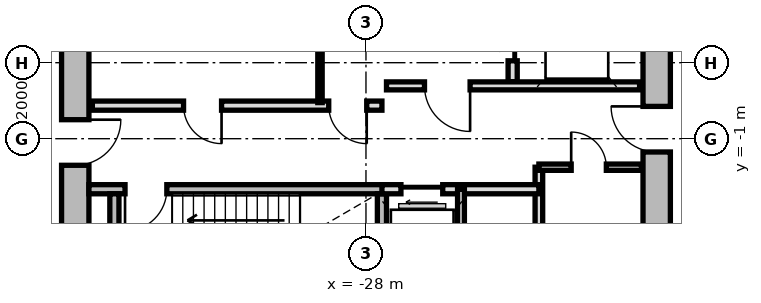
"""IFC4 building model, lengths in metres.
Left out: names, types, materials, properties, quantities, classifications, styles, units other than length and angle.
Written with IfcOpenShell. Run it as: python <this file> out.ifc"""

import sys

from ifc_helpers import new_model, si_unit, direction, frame, frame_2d, origin, place, context, subcontext, project, spatial, rectangle, extrude, source, transform, mapped, element, fill, save


model = new_model("IFC4")
c1 = context("Model", 3, precision=1e-05, world=origin(), true_north=direction((0.0, 1.0)))
c2 = subcontext(c1, "Body", "Model", "MODEL_VIEW")
j1 = project(units=[si_unit("LENGTHUNIT", "METRE"), si_unit("PLANEANGLEUNIT", "RADIAN")], contexts=[c1])
p1 = place(None, origin())
s1 = spatial("IfcSite", under=j1, at=p1, CompositionType="ELEMENT")
p2 = place(p1, origin())
s2 = spatial("IfcBuilding", under=s1, at=p2, CompositionType="ELEMENT")
p3 = place(p2, frame((0.0, 0.0, 129.8)))
s3 = spatial("IfcBuildingStorey", under=s2, at=p3, CompositionType="ELEMENT", Elevation=129.8)
m1 = source(origin(), c2, "Body", "SweptSolid", [
    extrude(rectangle(XDim=11.0, YDim=0.72, at=frame_2d((5.5, 0.0))), origin(), (0.0, 0.0, 1.0), 4.08),
])
p4 = place(p3, frame((-35.65, -5.5, 0.0), z_axis=(0.0, 0.0, 1.0), x_axis=(0.0, 1.0, 0.0)))
e1 = element("IfcWall", 1, at=p4, inside=s3, PredefinedType="SHEAR", context=c2, shape_type="MappedRepresentation", body=[
    mapped(m1, transform((0.0, 0.0, 0.0), x_axis=(1.0, 0.0, 0.0), y_axis=(0.0, 1.0, 0.0), z_axis=(0.0, 0.0, 1.0), scale=1.0)),
])
p5 = place(p4, frame((3.8, 0.0, 0.0)))
e2 = element("IfcOpeningElement", 2, at=p5, cuts=e1, PredefinedType="OPENING", context=c2, shape_type="SweptSolid", body=[
    extrude(rectangle(XDim=1.2, YDim=2.15, at=frame_2d((0.6, 1.075))), frame((0.0, 0.37, 0.0), z_axis=(0.0, -1.0, 0.0), x_axis=(1.0, 0.0, 0.0)), (0.0, 0.0, 1.0), 0.74),
])
p6 = place(p3, frame((-20.35, 5.5, 0.0), z_axis=(0.0, 0.0, 1.0), x_axis=(0.0, -1.0, 0.0)))
e3 = element("IfcWall", 3, at=p6, inside=s3, PredefinedType="SHEAR", context=c2, shape_type="MappedRepresentation", body=[
    mapped(m1, transform((0.0, 0.0, 0.0), x_axis=(1.0, 0.0, 0.0), y_axis=(0.0, 1.0, 0.0), z_axis=(0.0, 0.0, 1.0), scale=1.0)),
])
p7 = place(p6, frame((5.65, 0.0, 0.0)))
e4 = element("IfcOpeningElement", 4, at=p7, cuts=e3, PredefinedType="OPENING", context=c2, shape_type="SweptSolid", body=[
    extrude(rectangle(XDim=1.2, YDim=2.15, at=frame_2d((0.6, 1.075))), frame((0.0, 0.37, 0.0), z_axis=(0.0, -1.0, 0.0), x_axis=(1.0, 0.0, 0.0)), (0.0, 0.0, 1.0), 0.74),
])
p8 = place(p6, frame((9.3, 0.0, 0.0)))
e5 = element("IfcOpeningElement", 5, at=p8, cuts=e3, PredefinedType="OPENING", context=c2, shape_type="SweptSolid", body=[
    extrude(rectangle(XDim=1.0, YDim=2.1, at=frame_2d((0.5, 1.05))), frame((0.0, 0.37, 0.0), z_axis=(0.0, -1.0, 0.0), x_axis=(1.0, 0.0, 0.0)), (0.0, 0.0, 1.0), 0.74),
])
m2 = source(origin(), c2, "Body", "SweptSolid", [
    extrude(rectangle(XDim=7.83, YDim=0.24, at=frame_2d((3.915, 0.0))), origin(), (0.0, 0.0, 1.0), 4.08),
])
p9 = place(p3, frame((-35.29, -2.33, 0.0), z_axis=(0.0, 0.0, 1.0), x_axis=(1.0, 0.0, 0.0)))
e6 = element("IfcWall", 6, at=p9, inside=s3, PredefinedType="PARTITIONING", context=c2, shape_type="MappedRepresentation", body=[
    mapped(m2, transform((0.0, 0.0, 0.0), x_axis=(1.0, 0.0, 0.0), y_axis=(0.0, 1.0, 0.0), z_axis=(0.0, 0.0, 1.0), scale=1.0)),
])
p10 = place(p9, frame((0.95, 0.0, 0.0)))
e7 = element("IfcOpeningElement", 7, at=p10, cuts=e6, PredefinedType="OPENING", context=c2, shape_type="SweptSolid", body=[
    extrude(rectangle(XDim=1.1, YDim=2.15, at=frame_2d((0.55, 1.075))), frame((0.0, 0.13, 0.0), z_axis=(0.0, -1.0, 0.0), x_axis=(1.0, 0.0, 0.0)), (0.0, 0.0, 1.0), 0.26),
])
m3 = source(origin(), c2, "Body", "SweptSolid", [
    extrude(rectangle(XDim=3.14, YDim=0.24, at=frame_2d((1.57, 0.0))), origin(), (0.0, 0.0, 1.0), 4.08),
])
for number, where, z_axis, x_axis in (
    (8, (-34.62, -5.59, 0.0), (0.0, 0.0, 1.0), (0.0, 1.0, 0.0)),
    (9, (-27.58, -5.59, 0.0), (0.0, 0.0, 1.0), (0.0, 1.0, 0.0)),
):
    element("IfcWall", number, at=place(p3, frame(where, z_axis=z_axis, x_axis=x_axis)), inside=s3, PredefinedType="PARTITIONING", context=c2, shape_type="MappedRepresentation", body=[
        mapped(m3, transform((0.0, 0.0, 0.0), x_axis=(1.0, 0.0, 0.0), y_axis=(0.0, 1.0, 0.0), z_axis=(0.0, 0.0, 1.0), scale=1.0)),
    ])
m4 = source(origin(), c2, "Body", "SweptSolid", [
    extrude(rectangle(XDim=5.0, YDim=0.24, at=frame_2d((2.5, 0.0))), origin(), (0.0, 0.0, 1.0), 4.065),
])
p11 = place(p3, frame((-24.14, 0.5, 0.0), z_axis=(0.0, 0.0, 1.0), x_axis=(0.0, 1.0, 0.0)))
e10 = element("IfcWall", 10, at=p11, inside=s3, PredefinedType="PARTITIONING", context=c2, shape_type="MappedRepresentation", body=[
    mapped(m4, transform((0.0, 0.0, 0.0), x_axis=(1.0, 0.0, 0.0), y_axis=(0.0, 1.0, 0.0), z_axis=(0.0, 0.0, 1.0), scale=1.0)),
])
p12 = place(p11, frame((3.05, 0.0, 0.0)))
e11 = element("IfcOpeningElement", 11, at=p12, cuts=e10, PredefinedType="OPENING", context=c2, shape_type="SweptSolid", body=[
    extrude(rectangle(XDim=1.3, YDim=2.2, at=frame_2d((0.65, 1.1))), frame((0.0, 0.13, 0.0), z_axis=(0.0, -1.0, 0.0), x_axis=(1.0, 0.0, 0.0)), (0.0, 0.0, 1.0), 0.26),
])
p13 = place(p11, frame((0.55, 0.0, 0.0)))
e12 = element("IfcOpeningElement", 12, at=p13, cuts=e10, PredefinedType="OPENING", context=c2, shape_type="SweptSolid", body=[
    extrude(rectangle(XDim=1.3, YDim=2.2, at=frame_2d((0.65, 1.1))), frame((0.0, 0.13, 0.0), z_axis=(0.0, -1.0, 0.0), x_axis=(1.0, 0.0, 0.0)), (0.0, 0.0, 1.0), 0.26),
])
m5 = source(origin(), c2, "Body", "SweptSolid", [
    extrude(rectangle(XDim=6.66, YDim=0.21, at=frame_2d((3.33, 0.0))), origin(), (0.0, 0.0, 1.0), 4.065),
])
p14 = place(p3, frame((-27.46, 0.39, 0.0), z_axis=(0.0, 0.0, 1.0), x_axis=(1.0, 0.0, 0.0)))
e13 = element("IfcWall", 13, at=p14, inside=s3, PredefinedType="PARTITIONING", context=c2, shape_type="MappedRepresentation", body=[
    mapped(m5, transform((0.0, 0.0, 0.0), x_axis=(1.0, 0.0, 0.0), y_axis=(0.0, 1.0, 0.0), z_axis=(0.0, 0.0, 1.0), scale=1.0)),
])
p15 = place(p14, frame((1.0, 0.0, 0.0)))
e14 = element("IfcOpeningElement", 14, at=p15, cuts=e13, PredefinedType="OPENING", context=c2, shape_type="SweptSolid", body=[
    extrude(rectangle(XDim=1.2, YDim=2.15, at=frame_2d((0.6, 1.075))), frame((0.0, 0.115, 0.0), z_axis=(0.0, -1.0, 0.0), x_axis=(1.0, 0.0, 0.0)), (0.0, 0.0, 1.0), 0.23),
])
m6 = source(origin(), c2, "Body", "SweptSolid", [
    extrude(rectangle(XDim=7.62, YDim=0.24, at=frame_2d((3.81, 0.0))), origin(), (0.0, 0.0, 1.0), 4.065),
])
p16 = place(p3, frame((-35.2, -0.13, 0.0), z_axis=(0.0, 0.0, 1.0), x_axis=(1.0, 0.0, 0.0)))
e15 = element("IfcWall", 15, at=p16, inside=s3, PredefinedType="PARTITIONING", context=c2, shape_type="MappedRepresentation", body=[
    mapped(m6, transform((0.0, 0.0, 0.0), x_axis=(1.0, 0.0, 0.0), y_axis=(0.0, 1.0, 0.0), z_axis=(0.0, 0.0, 1.0), scale=1.0)),
])
p17 = place(p16, frame((6.22, 0.0, 0.0)))
e16 = element("IfcOpeningElement", 16, at=p17, cuts=e15, PredefinedType="OPENING", context=c2, shape_type="SweptSolid", body=[
    extrude(rectangle(XDim=1.0, YDim=2.1, at=frame_2d((0.5, 1.05))), frame((0.0, 0.13, 0.0), z_axis=(0.0, -1.0, 0.0), x_axis=(1.0, 0.0, 0.0)), (0.0, 0.0, 1.0), 0.26),
])
p18 = place(p16, frame((2.4, 0.0, 0.0)))
e17 = element("IfcOpeningElement", 17, at=p18, cuts=e15, PredefinedType="OPENING", context=c2, shape_type="SweptSolid", body=[
    extrude(rectangle(XDim=1.0, YDim=2.1, at=frame_2d((0.5, 1.05))), frame((0.0, 0.13, 0.0), z_axis=(0.0, -1.0, 0.0), x_axis=(1.0, 0.0, 0.0)), (0.0, 0.0, 1.0), 0.26),
])
m7 = source(origin(), c2, "Body", "SweptSolid", [
    extrude(rectangle(XDim=2.33, YDim=0.115, at=frame_2d((1.165, 0.0))), origin(), (0.0, 0.0, 1.0), 4.065),
])
p19 = place(p3, frame((-29.21, -0.05, 0.0), z_axis=(0.0, 0.0, 1.0), x_axis=(0.0, 1.0, 0.0)))
e18 = element("IfcWall", 18, at=p19, inside=s3, PredefinedType="PARTITIONING", context=c2, shape_type="MappedRepresentation", body=[
    mapped(m7, transform((0.0, 0.0, 0.0), x_axis=(1.0, 0.0, 0.0), y_axis=(0.0, 1.0, 0.0), z_axis=(0.0, 0.0, 1.0), scale=1.0)),
])
m8 = source(origin(), c2, "Body", "SweptSolid", [
    extrude(rectangle(XDim=3.8, YDim=0.2, at=frame_2d((1.9, 0.0))), origin(), (0.0, 0.0, 1.0), 4.065),
])
p20 = place(p3, frame((-23.45, -5.55, 0.0), z_axis=(0.0, 0.0, 1.0), x_axis=(0.0, 1.0, 0.0)))
e19 = element("IfcWall", 19, at=p20, inside=s3, PredefinedType="PARTITIONING", context=c2, shape_type="MappedRepresentation", body=[
    mapped(m8, transform((0.0, 0.0, 0.0), x_axis=(1.0, 0.0, 0.0), y_axis=(0.0, 1.0, 0.0), z_axis=(0.0, 0.0, 1.0), scale=1.0)),
])
m9 = source(origin(), c2, "Body", "SweptSolid", [
    extrude(rectangle(XDim=4.13, YDim=0.24, at=frame_2d((2.065, 0.0))), origin(), (0.0, 0.0, 1.0), 4.065),
])
p21 = place(p3, frame((-27.58, -2.33, 0.0), z_axis=(0.0, 0.0, 1.0), x_axis=(1.0, 0.0, 0.0)))
e20 = element("IfcWall", 20, at=p21, inside=s3, PredefinedType="PARTITIONING", context=c2, shape_type="MappedRepresentation", body=[
    mapped(m9, transform((0.0, 0.0, 0.0), x_axis=(1.0, 0.0, 0.0), y_axis=(0.0, 1.0, 0.0), z_axis=(0.0, 0.0, 1.0), scale=1.0)),
])
p22 = place(p21, frame((0.5, 0.0, 0.0)))
e21 = element("IfcOpeningElement", 21, at=p22, cuts=e20, PredefinedType="OPENING", context=c2, shape_type="SweptSolid", body=[
    extrude(rectangle(XDim=1.1, YDim=2.2, at=frame_2d((0.55, 1.1))), frame((0.0, 0.13, 0.0), z_axis=(0.0, -1.0, 0.0), x_axis=(1.0, 0.0, 0.0)), (0.0, 0.0, 1.0), 0.26),
])
m10 = source(origin(), c2, "Body", "SweptSolid", [
    extrude(rectangle(XDim=3.22, YDim=0.18, at=frame_2d((1.61, 0.0))), origin(), (0.0, 0.0, 1.0), 4.065),
])
p23 = place(p3, frame((-25.5, -5.55, 0.0), z_axis=(0.0, 0.0, 1.0), x_axis=(0.0, 1.0, 0.0)))
e22 = element("IfcWall", 22, at=p23, inside=s3, PredefinedType="PARTITIONING", context=c2, shape_type="MappedRepresentation", body=[
    mapped(m10, transform((0.0, 0.0, 0.0), x_axis=(1.0, 0.0, 0.0), y_axis=(0.0, 1.0, 0.0), z_axis=(0.0, 0.0, 1.0), scale=1.0)),
])
m11 = source(origin(), c2, "Body", "SweptSolid", [
    extrude(rectangle(XDim=2.7, YDim=0.165, at=frame_2d((1.35, 0.0))), origin(), (0.0, 0.0, 1.0), 4.065),
])
p24 = place(p3, frame((-23.45, -1.75, 0.0), z_axis=(0.0, 0.0, 1.0), x_axis=(1.0, 0.0, 0.0)))
e23 = element("IfcWall", 23, at=p24, inside=s3, PredefinedType="PARTITIONING", context=c2, shape_type="MappedRepresentation", body=[
    mapped(m11, transform((0.0, 0.0, 0.0), x_axis=(1.0, 0.0, 0.0), y_axis=(0.0, 1.0, 0.0), z_axis=(0.0, 0.0, 1.0), scale=1.0)),
])
p25 = place(p24, frame((0.85, 0.0, 0.0)))
e24 = element("IfcOpeningElement", 24, at=p25, cuts=e23, PredefinedType="OPENING", context=c2, shape_type="SweptSolid", body=[
    extrude(rectangle(XDim=0.925, YDim=2.1, at=frame_2d((0.462, 1.05))), frame((0.0, 0.093, 0.0), z_axis=(0.0, -1.0, 0.0), x_axis=(1.0, 0.0, 0.0)), (0.0, 0.0, 1.0), 0.185),
])
m12 = source(origin(), c2, "Body", "SweptSolid", [
    extrude(rectangle(XDim=1.1, YDim=2.15, at=frame_2d((0.55, 1.075))), frame((0.0, 0.025, 0.0), z_axis=(0.0, -1.0, 0.0), x_axis=(1.0, 0.0, 0.0)), (0.0, 0.0, 1.0), 0.05),
])
p26 = place(p10, frame((1.1, 0.0, 0.0), z_axis=(0.0, 0.0, 1.0), x_axis=(-1.0, 0.0, 0.0)))
e25 = element("IfcDoor", 25, at=p26, inside=s3, OperationType="SINGLE_SWING_RIGHT", PredefinedType="DOOR", context=c2, shape_type="MappedRepresentation", body=[
    mapped(m12, transform((0.0, 0.0, 0.0), x_axis=(1.0, 0.0, 0.0), y_axis=(0.0, 1.0, 0.0), z_axis=(0.0, 0.0, 1.0), scale=1.0)),
])
fill(e7, e25)
m13 = source(origin(), c2, "Body", "SweptSolid", [
    extrude(rectangle(XDim=1.3, YDim=2.2, at=frame_2d((0.65, 1.1))), frame((0.0, 0.025, 0.0), z_axis=(0.0, -1.0, 0.0), x_axis=(1.0, 0.0, 0.0)), (0.0, 0.0, 1.0), 0.05),
])
p27 = place(p13, origin())
e26 = element("IfcDoor", 26, at=p27, inside=s3, OperationType="SLIDING_TO_RIGHT", PredefinedType="DOOR", context=c2, shape_type="MappedRepresentation", body=[
    mapped(m13, transform((0.0, 0.0, 0.0), x_axis=(1.0, 0.0, 0.0), y_axis=(0.0, 1.0, 0.0), z_axis=(0.0, 0.0, 1.0), scale=1.0)),
])
fill(e12, e26)
m14 = source(origin(), c2, "Body", "SweptSolid", [
    extrude(rectangle(XDim=1.2, YDim=2.15, at=frame_2d((0.6, 1.075))), frame((0.0, 0.025, 0.0), z_axis=(0.0, -1.0, 0.0), x_axis=(1.0, 0.0, 0.0)), (0.0, 0.0, 1.0), 0.05),
])
p28 = place(p15, frame((1.2, 0.0, 0.0), z_axis=(0.0, 0.0, 1.0), x_axis=(-1.0, 0.0, 0.0)))
e27 = element("IfcDoor", 27, at=p28, inside=s3, OperationType="SINGLE_SWING_LEFT", PredefinedType="DOOR", context=c2, shape_type="MappedRepresentation", body=[
    mapped(m14, transform((0.0, 0.0, 0.0), x_axis=(1.0, 0.0, 0.0), y_axis=(0.0, 1.0, 0.0), z_axis=(0.0, 0.0, 1.0), scale=1.0)),
])
fill(e14, e27)
p29 = place(p5, frame((1.2, 0.0, 0.0), z_axis=(0.0, 0.0, 1.0), x_axis=(-1.0, 0.0, 0.0)))
e28 = element("IfcDoor", 28, at=p29, inside=s3, OperationType="SINGLE_SWING_LEFT", PredefinedType="DOOR", context=c2, shape_type="MappedRepresentation", body=[
    mapped(m14, transform((0.0, 0.0, 0.0), x_axis=(1.0, 0.0, 0.0), y_axis=(0.0, 1.0, 0.0), z_axis=(0.0, 0.0, 1.0), scale=1.0)),
])
fill(e2, e28)
p30 = place(p7, frame((1.2, 0.0, 0.0), z_axis=(0.0, 0.0, 1.0), x_axis=(-1.0, 0.0, 0.0)))
e29 = element("IfcDoor", 29, at=p30, inside=s3, OperationType="SINGLE_SWING_RIGHT", PredefinedType="DOOR", context=c2, shape_type="MappedRepresentation", body=[
    mapped(m14, transform((0.0, 0.0, 0.0), x_axis=(1.0, 0.0, 0.0), y_axis=(0.0, 1.0, 0.0), z_axis=(0.0, 0.0, 1.0), scale=1.0)),
])
fill(e4, e29)
m15 = source(origin(), c2, "Body", "SweptSolid", [
    extrude(rectangle(XDim=1.0, YDim=2.1, at=frame_2d((0.5, 1.05))), frame((0.0, 0.025, 0.0), z_axis=(0.0, -1.0, 0.0), x_axis=(1.0, 0.0, 0.0)), (0.0, 0.0, 1.0), 0.05),
])
p31 = place(p17, frame((1.0, 0.0, 0.0), z_axis=(0.0, 0.0, 1.0), x_axis=(-1.0, 0.0, 0.0)))
e30 = element("IfcDoor", 30, at=p31, inside=s3, OperationType="SINGLE_SWING_LEFT", PredefinedType="DOOR", context=c2, shape_type="MappedRepresentation", body=[
    mapped(m15, transform((0.0, 0.0, 0.0), x_axis=(1.0, 0.0, 0.0), y_axis=(0.0, 1.0, 0.0), z_axis=(0.0, 0.0, 1.0), scale=1.0)),
])
fill(e16, e30)
p32 = place(p18, frame((1.0, 0.0, 0.0), z_axis=(0.0, 0.0, 1.0), x_axis=(-1.0, 0.0, 0.0)))
e31 = element("IfcDoor", 31, at=p32, inside=s3, OperationType="SINGLE_SWING_LEFT", PredefinedType="DOOR", context=c2, shape_type="MappedRepresentation", body=[
    mapped(m15, transform((0.0, 0.0, 0.0), x_axis=(1.0, 0.0, 0.0), y_axis=(0.0, 1.0, 0.0), z_axis=(0.0, 0.0, 1.0), scale=1.0)),
])
fill(e17, e31)
m16 = source(origin(), c2, "Body", "SweptSolid", [
    extrude(rectangle(XDim=1.1, YDim=2.2, at=frame_2d((0.55, 1.1))), frame((0.0, 0.025, 0.0), z_axis=(0.0, -1.0, 0.0), x_axis=(1.0, 0.0, 0.0)), (0.0, 0.0, 1.0), 0.05),
])
p33 = place(p22, frame((1.1, 0.0, 0.0), z_axis=(0.0, 0.0, 1.0), x_axis=(-1.0, 0.0, 0.0)))
e32 = element("IfcDoor", 32, at=p33, inside=s3, OperationType="SLIDING_TO_LEFT", PredefinedType="DOOR", context=c2, shape_type="MappedRepresentation", body=[
    mapped(m16, transform((0.0, 0.0, 0.0), x_axis=(1.0, 0.0, 0.0), y_axis=(0.0, 1.0, 0.0), z_axis=(0.0, 0.0, 1.0), scale=1.0)),
])
fill(e21, e32)
m17 = source(origin(), c2, "Body", "SweptSolid", [
    extrude(rectangle(XDim=0.925, YDim=2.1, at=frame_2d((0.462, 1.05))), frame((0.0, 0.025, 0.0), z_axis=(0.0, -1.0, 0.0), x_axis=(1.0, 0.0, 0.0)), (0.0, 0.0, 1.0), 0.05),
])
p34 = place(p25, origin())
e33 = element("IfcDoor", 33, at=p34, inside=s3, OperationType="SINGLE_SWING_LEFT", PredefinedType="DOOR", context=c2, shape_type="MappedRepresentation", body=[
    mapped(m17, transform((0.0, 0.0, 0.0), x_axis=(1.0, 0.0, 0.0), y_axis=(0.0, 1.0, 0.0), z_axis=(0.0, 0.0, 1.0), scale=1.0)),
])
fill(e24, e33)
save(model, sys.argv[1])
